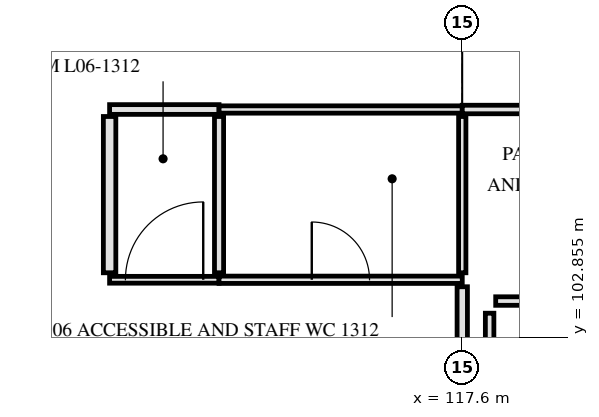
"""IFC4 building model, lengths in metres.
Left out: names, types, materials, properties, quantities, classifications, styles, units other than length and angle.
Written with IfcOpenShell. Run it as: python <this file> out.ifc"""

import sys

from ifc_helpers import new_model, si_unit, direction, frame, frame_2d, origin, place, context, subcontext, project, spatial, rectangle, extrude, element, fill, save


model = new_model("IFC4")
c1 = context("Model", 3, precision=1e-05, world=origin(), true_north=direction((0.0, 1.0)))
c2 = subcontext(c1, "Body", "Model", "MODEL_VIEW")
j1 = project(units=[si_unit("LENGTHUNIT", "METRE"), si_unit("PLANEANGLEUNIT", "RADIAN")], contexts=[c1])
p1 = place(None, origin())
s1 = spatial("IfcSite", under=j1, at=p1, CompositionType="ELEMENT")
p2 = place(p1, origin())
s2 = spatial("IfcBuilding", under=s1, at=p2, CompositionType="ELEMENT")
p3 = place(p2, frame((0.0, 0.0, 26.4)))
s3 = spatial("IfcBuildingStorey", under=s2, at=p3, CompositionType="ELEMENT", Elevation=26.4)
p4 = place(p3, frame((118.15, 103.45, 0.0), z_axis=(0.0, 0.0, 1.0), x_axis=(1.0, 0.0, 0.0)))
e1 = element("IfcWall", 1, at=p4, inside=s3, PredefinedType="PARTITIONING", context=c2, shape_type="SweptSolid", body=[
    extrude(rectangle(XDim=7.85, YDim=0.14, at=frame_2d((3.925, 0.0))), origin(), (0.0, 0.0, 1.0), 3.11),
])
p5 = place(p4, frame((3.025, 0.0, 0.0)))
e2 = element("IfcOpeningElement", 2, at=p5, cuts=e1, PredefinedType="OPENING", context=c2, shape_type="SweptSolid", body=[
    extrude(rectangle(XDim=1.8, YDim=2.25, at=frame_2d((0.9, 1.125))), frame((0.0, 0.08, 0.0), z_axis=(0.0, -1.0, 0.0), x_axis=(1.0, 0.0, 0.0)), (0.0, 0.0, 1.0), 0.16),
])
p6 = place(p3, frame((111.8, 103.8, 0.0), z_axis=(0.0, 0.0, 1.0), x_axis=(1.0, 0.0, 0.0)))
e3 = element("IfcWall", 3, at=p6, inside=s3, PredefinedType="PARTITIONING", context=c2, shape_type="SweptSolid", body=[
    extrude(rectangle(XDim=1.8, YDim=0.112, at=frame_2d((0.9, 0.0))), origin(), (0.0, 0.0, 1.0), 3.61),
])
p7 = place(p6, frame((0.26, 0.0, 0.0)))
e4 = element("IfcOpeningElement", 4, at=p7, cuts=e3, PredefinedType="OPENING", context=c2, shape_type="SweptSolid", body=[
    extrude(rectangle(XDim=1.28, YDim=2.18, at=frame_2d((0.64, 1.09))), frame((0.0, 0.066, 0.0), z_axis=(0.0, -1.0, 0.0), x_axis=(1.0, 0.0, 0.0)), (0.0, 0.0, 1.0), 0.132),
])
p8 = place(p3, frame((113.6, 103.8, 0.0), z_axis=(0.0, 0.0, 1.0), x_axis=(1.0, 0.0, 0.0)))
e5 = element("IfcWall", 5, at=p8, inside=s3, PredefinedType="PARTITIONING", context=c2, shape_type="SweptSolid", body=[
    extrude(rectangle(XDim=4.0, YDim=0.12, at=frame_2d((2.0, 0.0))), origin(), (0.0, 0.0, 1.0), 3.21),
])
p9 = place(p8, frame((1.525, 0.0, 0.0)))
e6 = element("IfcOpeningElement", 6, at=p9, cuts=e5, PredefinedType="OPENING", context=c2, shape_type="SweptSolid", body=[
    extrude(rectangle(XDim=0.95, YDim=2.1, at=frame_2d((0.475, 1.05))), frame((0.0, 0.07, 0.0), z_axis=(0.0, -1.0, 0.0), x_axis=(1.0, 0.0, 0.0)), (0.0, 0.0, 1.0), 0.14),
])
p10 = place(p3, frame((111.8, 106.6, 0.0), z_axis=(0.0, 0.0, 1.0), x_axis=(1.0, 0.0, 0.0)))
e7 = element("IfcWall", 7, at=p10, inside=s3, PredefinedType="PARTITIONING", context=c2, shape_type="SweptSolid", body=[
    extrude(rectangle(XDim=1.8, YDim=0.16, at=frame_2d((0.9, 0.0))), origin(), (0.0, 0.0, 1.0), 3.61),
])
p11 = place(p3, frame((113.6, 106.6, 0.0), z_axis=(0.0, 0.0, 1.0), x_axis=(1.0, 0.0, 0.0)))
e8 = element("IfcWall", 8, at=p11, inside=s3, PredefinedType="PARTITIONING", context=c2, shape_type="SweptSolid", body=[
    extrude(rectangle(XDim=4.0, YDim=0.12, at=frame_2d((2.0, 0.0))), origin(), (0.0, 0.0, 1.0), 3.21),
])
p12 = place(p3, frame((117.6, 106.6, 0.0), z_axis=(0.0, 0.0, 1.0), x_axis=(1.0, 0.0, 0.0)))
e9 = element("IfcWall", 9, at=p12, inside=s3, PredefinedType="PARTITIONING", context=c2, shape_type="SweptSolid", body=[
    extrude(rectangle(XDim=8.4, YDim=0.14, at=frame_2d((4.2, 0.0))), origin(), (0.0, 0.0, 1.0), 3.11),
])
p13 = place(p3, frame((111.8, 103.915, 0.0), z_axis=(0.0, 0.0, 1.0), x_axis=(0.0, 1.0, 0.0)))
e10 = element("IfcWall", 10, at=p13, inside=s3, PredefinedType="PARTITIONING", context=c2, shape_type="SweptSolid", body=[
    extrude(rectangle(XDim=2.57, YDim=0.205, at=frame_2d((1.285, 0.0))), origin(), (0.0, 0.0, 1.0), 3.34),
])
p14 = place(p3, frame((113.6, 103.915, 0.0), z_axis=(0.0, 0.0, 1.0), x_axis=(0.0, 1.0, 0.0)))
e11 = element("IfcWall", 11, at=p14, inside=s3, PredefinedType="PARTITIONING", context=c2, shape_type="SweptSolid", body=[
    extrude(rectangle(XDim=2.57, YDim=0.15, at=frame_2d((1.285, 0.0))), origin(), (0.0, 0.0, 1.0), 3.34),
])
p15 = place(p3, frame((117.6, 101.045, 0.0), z_axis=(0.0, 0.0, 1.0), x_axis=(0.0, 1.0, 0.0)))
e12 = element("IfcWall", 12, at=p15, inside=s3, PredefinedType="PARTITIONING", context=c2, shape_type="SweptSolid", body=[
    extrude(rectangle(XDim=2.64, YDim=0.17, at=frame_2d((1.32, 0.0))), origin(), (0.0, 0.0, 1.0), 3.21),
])
p16 = place(p3, frame((117.6, 103.915, 0.0), z_axis=(0.0, 0.0, 1.0), x_axis=(0.0, 1.0, 0.0)))
e13 = element("IfcWall", 13, at=p16, inside=s3, PredefinedType="PARTITIONING", context=c2, shape_type="SweptSolid", body=[
    extrude(rectangle(XDim=2.57, YDim=0.12, at=frame_2d((1.285, 0.0))), origin(), (0.0, 0.0, 1.0), 3.21),
])
p17 = place(p3, frame((118.05, 101.365, 0.0), z_axis=(0.0, 0.0, 1.0), x_axis=(0.0, 1.0, 0.0)))
e14 = element("IfcWall", 14, at=p17, inside=s3, PredefinedType="PARTITIONING", context=c2, shape_type="SweptSolid", body=[
    extrude(rectangle(XDim=1.885, YDim=0.14, at=frame_2d((0.942, 0.0))), origin(), (0.0, 0.0, 1.0), 3.61),
])
p18 = place(p7, origin())
e15 = element("IfcDoor", 15, at=p18, inside=s3, OperationType="SINGLE_SWING_RIGHT", PredefinedType="DOOR", context=c2, shape_type="SweptSolid", body=[
    extrude(rectangle(XDim=1.28, YDim=2.18, at=frame_2d((0.64, 1.09))), frame((0.0, 0.025, 0.0), z_axis=(0.0, -1.0, 0.0), x_axis=(1.0, 0.0, 0.0)), (0.0, 0.0, 1.0), 0.05),
])
fill(e4, e15)
p19 = place(p9, origin())
e16 = element("IfcDoor", 16, at=p19, inside=s3, OperationType="SINGLE_SWING_LEFT", PredefinedType="DOOR", context=c2, shape_type="SweptSolid", body=[
    extrude(rectangle(XDim=0.95, YDim=2.1, at=frame_2d((0.475, 1.05))), frame((0.0, 0.025, 0.0), z_axis=(0.0, -1.0, 0.0), x_axis=(1.0, 0.0, 0.0)), (0.0, 0.0, 1.0), 0.05),
])
fill(e6, e16)
save(model, sys.argv[1])
